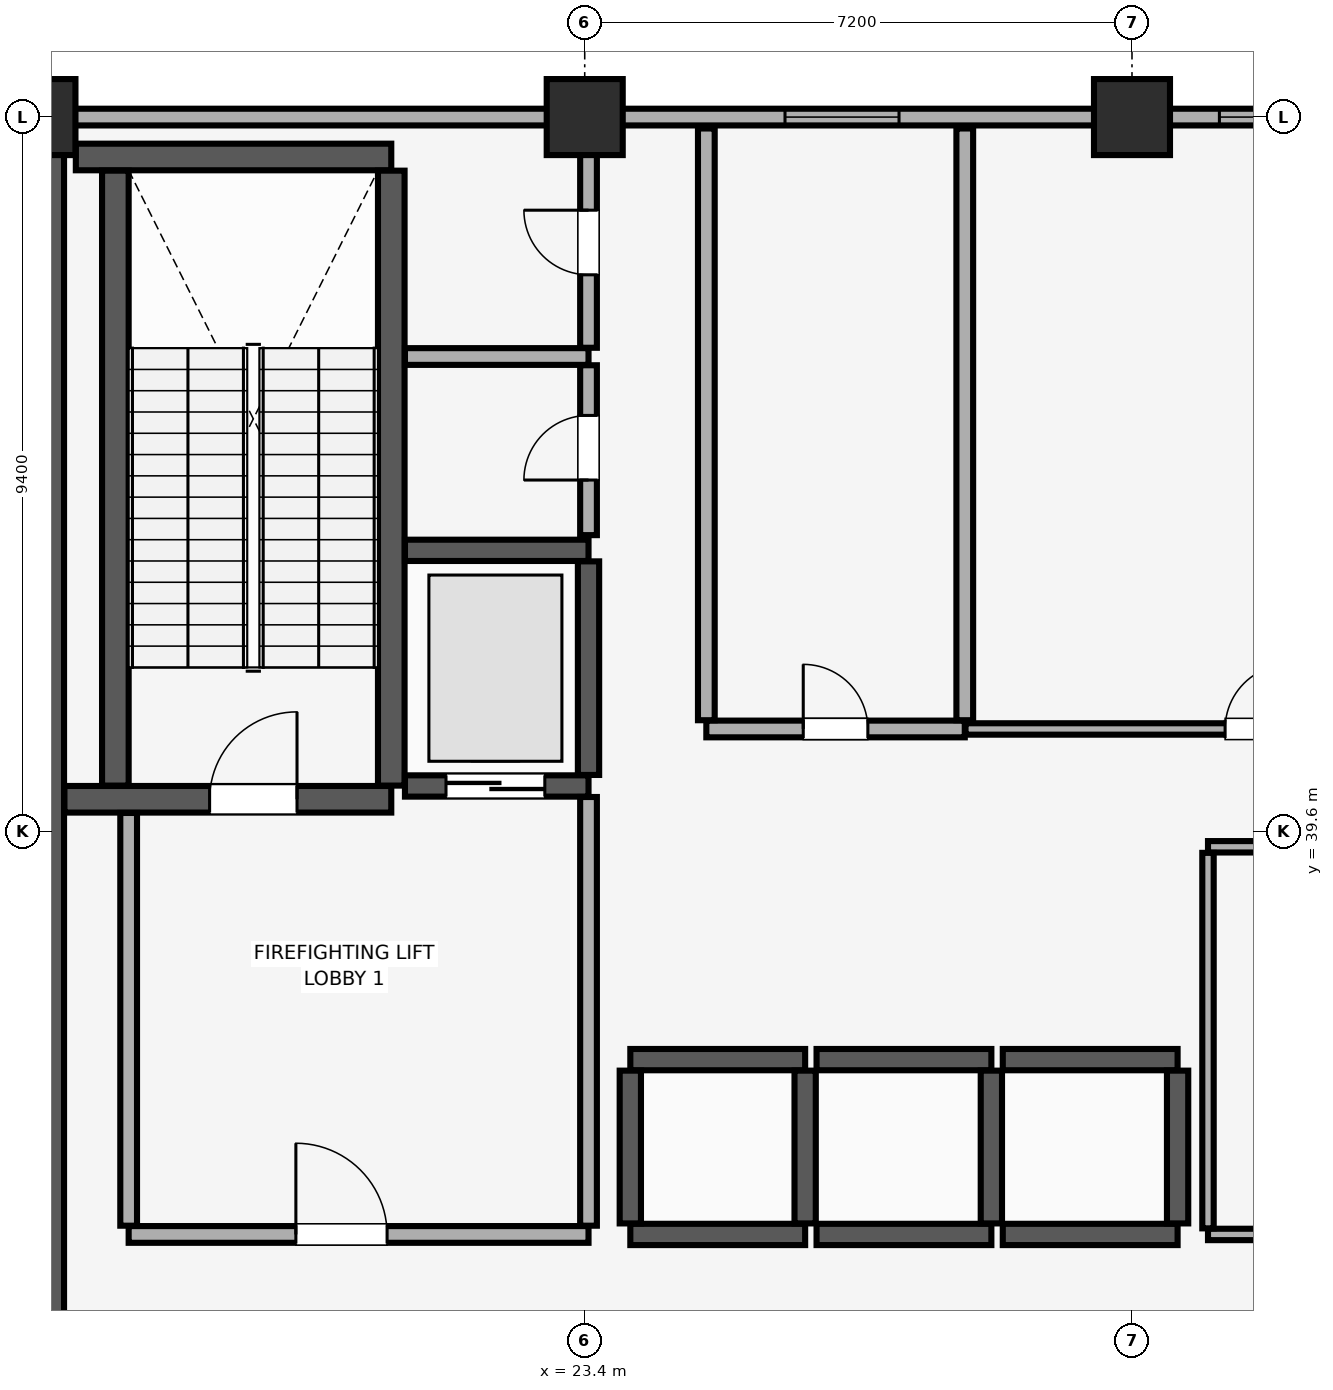
"""IFC4 building model, lengths in metres.
Left out: names, types, materials, properties, quantities, classifications, styles, units other than length and angle.
Written with IfcOpenShell. Run it as: python <this file> out.ifc"""

import sys

from ifc_helpers import new_model, si_unit, direction, frame, frame_2d, origin, origin_2d, place, context, subcontext, project, spatial, rectangle, extrude, element, fill, save


model = new_model("IFC4")
c1 = context("Model", 3, precision=1e-05, world=origin(), true_north=direction((0.0, 1.0)))
c2 = subcontext(c1, "Body", "Model", "MODEL_VIEW")
j1 = project(units=[si_unit("LENGTHUNIT", "METRE"), si_unit("PLANEANGLEUNIT", "RADIAN")], contexts=[c1])
p1 = place(None, origin())
s1 = spatial("IfcSite", under=j1, at=p1, CompositionType="ELEMENT")
p2 = place(p1, origin())
s2 = spatial("IfcBuilding", under=s1, at=p2, CompositionType="ELEMENT")
p3 = place(p2, frame((0.0, 0.0, 294.7)))
s3 = spatial("IfcBuildingStorey", under=s2, at=p3, CompositionType="ELEMENT", Elevation=294.7)
for number, where, z_axis, x_axis in (
    (1, (16.2, 49.0, 0.0), (0.0, 0.0, 1.0), (1.0, 0.0, 0.0)),
    (2, (23.4, 49.0, 0.0), (0.0, 0.0, 1.0), (1.0, 0.0, 0.0)),
    (3, (30.6, 49.0, 0.0), (0.0, 0.0, 1.0), (1.0, 0.0, 0.0)),
):
    element("IfcColumn", number, at=place(p3, frame(where, z_axis=z_axis, x_axis=x_axis)), inside=s3, PredefinedType="COLUMN", context=c2, shape_type="SweptSolid", body=[
        extrude(rectangle(XDim=1.0, YDim=1.0, at=origin_2d()), origin(), (0.0, 0.0, 1.0), 5.12),
    ])
p4 = place(p3, frame((71.4, 49.0, 0.0), z_axis=(0.0, 0.0, 1.0), x_axis=(-1.0, 0.0, 0.0)))
e4 = element("IfcWall", 4, at=p4, inside=s3, PredefinedType="SOLIDWALL", context=c2, shape_type="SweptSolid", body=[
    extrude(rectangle(XDim=58.8, YDim=0.22, at=frame_2d((29.4, 0.0))), origin(), (0.0, 0.0, 1.0), 4.32),
])
p5 = place(p4, frame((56.365, 0.0, 0.85)))
e5 = element("IfcOpeningElement", 5, at=p5, cuts=e4, PredefinedType="OPENING", context=c2, shape_type="SweptSolid", body=[
    extrude(rectangle(XDim=1.5, YDim=1.4, at=frame_2d((0.75, 0.7))), frame((0.0, 0.12, 0.0), z_axis=(0.0, -1.0, 0.0), x_axis=(1.0, 0.0, 0.0)), (0.0, 0.0, 1.0), 0.24),
])
p6 = place(p4, frame((0.935, 0.0, 0.85)))
e6 = element("IfcOpeningElement", 6, at=p6, cuts=e4, PredefinedType="OPENING", context=c2, shape_type="SweptSolid", body=[
    extrude(rectangle(XDim=1.5, YDim=1.4, at=frame_2d((0.75, 0.7))), frame((0.0, 0.12, 0.0), z_axis=(0.0, -1.0, 0.0), x_axis=(1.0, 0.0, 0.0)), (0.0, 0.0, 1.0), 0.24),
])
p7 = place(p4, frame((43.865, 0.0, 0.9)))
e7 = element("IfcOpeningElement", 7, at=p7, cuts=e4, PredefinedType="OPENING", context=c2, shape_type="SweptSolid", body=[
    extrude(rectangle(XDim=1.5, YDim=1.4, at=frame_2d((0.75, 0.7))), frame((0.0, 0.12, 0.0), z_axis=(0.0, -1.0, 0.0), x_axis=(1.0, 0.0, 0.0)), (0.0, 0.0, 1.0), 0.24),
])
p8 = place(p4, frame((36.05, 0.0, 0.9)))
e8 = element("IfcOpeningElement", 8, at=p8, cuts=e4, PredefinedType="OPENING", context=c2, shape_type="SweptSolid", body=[
    extrude(rectangle(XDim=3.6, YDim=1.5, at=frame_2d((1.8, 0.75))), frame((0.0, 0.12, 0.0), z_axis=(0.0, -1.0, 0.0), x_axis=(1.0, 0.0, 0.0)), (0.0, 0.0, 1.0), 0.24),
])
p9 = place(p4, frame((22.65, 0.0, 0.9)))
e9 = element("IfcOpeningElement", 9, at=p9, cuts=e4, PredefinedType="OPENING", context=c2, shape_type="SweptSolid", body=[
    extrude(rectangle(XDim=1.5, YDim=1.4, at=frame_2d((0.75, 0.7))), frame((0.0, 0.12, 0.0), z_axis=(0.0, -1.0, 0.0), x_axis=(1.0, 0.0, 0.0)), (0.0, 0.0, 1.0), 0.24),
])
p10 = place(p4, frame((19.0, 0.0, 0.9)))
e10 = element("IfcOpeningElement", 10, at=p10, cuts=e4, PredefinedType="OPENING", context=c2, shape_type="SweptSolid", body=[
    extrude(rectangle(XDim=2.4, YDim=1.5, at=frame_2d((1.2, 0.75))), frame((0.0, 0.12, 0.0), z_axis=(0.0, -1.0, 0.0), x_axis=(1.0, 0.0, 0.0)), (0.0, 0.0, 1.0), 0.24),
])
p11 = place(p4, frame((14.635, 0.0, 0.9)))
e11 = element("IfcOpeningElement", 11, at=p11, cuts=e4, PredefinedType="OPENING", context=c2, shape_type="SweptSolid", body=[
    extrude(rectangle(XDim=2.4, YDim=1.5, at=frame_2d((1.2, 0.75))), frame((0.0, 0.12, 0.0), z_axis=(0.0, -1.0, 0.0), x_axis=(1.0, 0.0, 0.0)), (0.0, 0.0, 1.0), 0.24),
])
p12 = place(p3, frame((16.2, 29.4, 0.0), z_axis=(0.0, 0.0, 1.0), x_axis=(0.0, 1.0, 0.0)))
e12 = element("IfcWall", 12, at=p12, inside=s3, PredefinedType="SHEAR", context=c2, shape_type="SweptSolid", body=[
    extrude(rectangle(XDim=19.2, YDim=0.7, at=frame_2d((9.6, 0.0))), origin(), (0.0, 0.0, 1.0), 5.12),
])
p13 = place(p3, frame((16.555, 40.025, 0.0), z_axis=(0.0, 0.0, 1.0), x_axis=(1.0, 0.0, 0.0)))
e13 = element("IfcWall", 13, at=p13, inside=s3, PredefinedType="SHEAR", context=c2, shape_type="SweptSolid", body=[
    extrude(rectangle(XDim=4.3, YDim=0.35, at=frame_2d((2.15, 0.0))), origin(), (0.0, 0.0, 1.0), 5.12),
])
p14 = place(p13, frame((1.91, 0.0, 0.0)))
e14 = element("IfcOpeningElement", 14, at=p14, cuts=e13, PredefinedType="OPENING", context=c2, shape_type="SweptSolid", body=[
    extrude(rectangle(XDim=1.15, YDim=2.15, at=frame_2d((0.575, 1.075))), frame((0.0, 0.185, 0.0), z_axis=(0.0, -1.0, 0.0), x_axis=(1.0, 0.0, 0.0)), (0.0, 0.0, 1.0), 0.37),
])
p15 = place(p3, frame((16.705, 48.475, 0.0), z_axis=(0.0, 0.0, 1.0), x_axis=(1.0, 0.0, 0.0)))
e15 = element("IfcWall", 15, at=p15, inside=s3, PredefinedType="SHEAR", context=c2, shape_type="SweptSolid", body=[
    extrude(rectangle(XDim=4.15, YDim=0.35, at=frame_2d((2.075, 0.0))), origin(), (0.0, 0.0, 1.0), 5.12),
])
for number, where, z_axis, x_axis in (
    (16, (17.225, 40.205, 0.0), (0.0, 0.0, 1.0), (0.0, 1.0, 0.0)),
    (17, (20.855, 40.205, 0.0), (0.0, 0.0, 1.0), (0.0, 1.0, 0.0)),
):
    element("IfcWall", number, at=place(p3, frame(where, z_axis=z_axis, x_axis=x_axis)), inside=s3, PredefinedType="SHEAR", context=c2, shape_type="SweptSolid", body=[
        extrude(rectangle(XDim=8.09, YDim=0.35, at=frame_2d((4.045, 0.0))), origin(), (0.0, 0.0, 1.0), 5.12),
    ])
for number, where, z_axis, x_axis in (
    (18, (24.0, 34.3, 0.0), (0.0, 0.0, 1.0), (1.0, 0.0, 0.0)),
    (19, (24.0, 36.6, 0.0), (0.0, 0.0, 1.0), (1.0, 0.0, 0.0)),
):
    element("IfcWall", number, at=place(p3, frame(where, z_axis=z_axis, x_axis=x_axis)), inside=s3, PredefinedType="SHEAR", context=c2, shape_type="SweptSolid", body=[
        extrude(rectangle(XDim=2.3, YDim=0.28, at=frame_2d((1.15, 0.0))), origin(), (0.0, 0.0, 1.0), 5.12),
    ])
for number, where, z_axis, x_axis in (
    (20, (24.0, 34.445, 0.0), (0.0, 0.0, 1.0), (0.0, 1.0, 0.0)),
    (21, (26.3, 34.445, 0.0), (0.0, 0.0, 1.0), (0.0, 1.0, 0.0)),
):
    element("IfcWall", number, at=place(p3, frame(where, z_axis=z_axis, x_axis=x_axis)), inside=s3, PredefinedType="SHEAR", context=c2, shape_type="SweptSolid", body=[
        extrude(rectangle(XDim=2.01, YDim=0.28, at=frame_2d((1.005, 0.0))), origin(), (0.0, 0.0, 1.0), 5.12),
    ])
for number, where, z_axis, x_axis in (
    (22, (26.45, 34.3, 0.0), (0.0, 0.0, 1.0), (1.0, 0.0, 0.0)),
    (23, (26.45, 36.6, 0.0), (0.0, 0.0, 1.0), (1.0, 0.0, 0.0)),
):
    element("IfcWall", number, at=place(p3, frame(where, z_axis=z_axis, x_axis=x_axis)), inside=s3, PredefinedType="SHEAR", context=c2, shape_type="SweptSolid", body=[
        extrude(rectangle(XDim=2.3, YDim=0.28, at=frame_2d((1.15, 0.0))), origin(), (0.0, 0.0, 1.0), 5.12),
    ])
p16 = place(p3, frame((28.75, 34.445, 0.0), z_axis=(0.0, 0.0, 1.0), x_axis=(0.0, 1.0, 0.0)))
e24 = element("IfcWall", 24, at=p16, inside=s3, PredefinedType="SHEAR", context=c2, shape_type="SweptSolid", body=[
    extrude(rectangle(XDim=2.01, YDim=0.28, at=frame_2d((1.005, 0.0))), origin(), (0.0, 0.0, 1.0), 5.12),
])
for number, where, z_axis, x_axis in (
    (25, (28.9, 34.3, 0.0), (0.0, 0.0, 1.0), (1.0, 0.0, 0.0)),
    (26, (28.9, 36.6, 0.0), (0.0, 0.0, 1.0), (1.0, 0.0, 0.0)),
):
    element("IfcWall", number, at=place(p3, frame(where, z_axis=z_axis, x_axis=x_axis)), inside=s3, PredefinedType="SHEAR", context=c2, shape_type="SweptSolid", body=[
        extrude(rectangle(XDim=2.3, YDim=0.28, at=frame_2d((1.15, 0.0))), origin(), (0.0, 0.0, 1.0), 5.12),
    ])
p17 = place(p3, frame((31.2, 34.445, 0.0), z_axis=(0.0, 0.0, 1.0), x_axis=(0.0, 1.0, 0.0)))
e27 = element("IfcWall", 27, at=p17, inside=s3, PredefinedType="SHEAR", context=c2, shape_type="SweptSolid", body=[
    extrude(rectangle(XDim=2.01, YDim=0.28, at=frame_2d((1.005, 0.0))), origin(), (0.0, 0.0, 1.0), 5.12),
])
p18 = place(p3, frame((21.035, 40.2, 0.0), z_axis=(0.0, 0.0, 1.0), x_axis=(1.0, 0.0, 0.0)))
e28 = element("IfcWall", 28, at=p18, inside=s3, PredefinedType="SHEAR", context=c2, shape_type="SweptSolid", body=[
    extrude(rectangle(XDim=2.415, YDim=0.28, at=frame_2d((1.208, 0.0))), origin(), (0.0, 0.0, 1.0), 5.12),
])
p19 = place(p18, frame((0.54, 0.0, 0.0)))
e29 = element("IfcOpeningElement", 29, at=p19, cuts=e28, PredefinedType="OPENING", context=c2, shape_type="SweptSolid", body=[
    extrude(rectangle(XDim=1.3, YDim=2.3, at=frame_2d((0.65, 1.15))), frame((0.0, 0.15, 0.0), z_axis=(0.0, -1.0, 0.0), x_axis=(1.0, 0.0, 0.0)), (0.0, 0.0, 1.0), 0.3),
])
p20 = place(p3, frame((21.035, 43.3, 0.0), z_axis=(0.0, 0.0, 1.0), x_axis=(1.0, 0.0, 0.0)))
e30 = element("IfcWall", 30, at=p20, inside=s3, PredefinedType="SHEAR", context=c2, shape_type="SweptSolid", body=[
    extrude(rectangle(XDim=2.415, YDim=0.28, at=frame_2d((1.208, 0.0))), origin(), (0.0, 0.0, 1.0), 5.12),
])
p21 = place(p3, frame((23.45, 40.345, 0.0), z_axis=(0.0, 0.0, 1.0), x_axis=(0.0, 1.0, 0.0)))
e31 = element("IfcWall", 31, at=p21, inside=s3, PredefinedType="SHEAR", context=c2, shape_type="SweptSolid", body=[
    extrude(rectangle(XDim=2.81, YDim=0.28, at=frame_2d((1.405, 0.0))), origin(), (0.0, 0.0, 1.0), 5.12),
])
p22 = place(p3, frame((17.4, 34.3, 0.0), z_axis=(0.0, 0.0, 1.0), x_axis=(1.0, 0.0, 0.0)))
e32 = element("IfcWall", 32, at=p22, inside=s3, PredefinedType="PARTITIONING", context=c2, shape_type="SweptSolid", body=[
    extrude(rectangle(XDim=6.05, YDim=0.22, at=frame_2d((3.025, 0.0))), origin(), (0.0, 0.0, 1.0), 5.12),
])
p23 = place(p22, frame((2.2, 0.0, 0.0)))
e33 = element("IfcOpeningElement", 33, at=p23, cuts=e32, PredefinedType="OPENING", context=c2, shape_type="SweptSolid", body=[
    extrude(rectangle(XDim=1.2, YDim=2.15, at=frame_2d((0.6, 1.075))), frame((0.0, 0.12, 0.0), z_axis=(0.0, -1.0, 0.0), x_axis=(1.0, 0.0, 0.0)), (0.0, 0.0, 1.0), 0.24),
])
p24 = place(p3, frame((17.4, 34.415, 0.0), z_axis=(0.0, 0.0, 1.0), x_axis=(0.0, 1.0, 0.0)))
e34 = element("IfcWall", 34, at=p24, inside=s3, PredefinedType="PARTITIONING", context=c2, shape_type="SweptSolid", body=[
    extrude(rectangle(XDim=5.43, YDim=0.22, at=frame_2d((2.715, 0.0))), origin(), (0.0, 0.0, 1.0), 5.12),
])
p25 = place(p3, frame((23.45, 34.415, 0.0), z_axis=(0.0, 0.0, 1.0), x_axis=(0.0, 1.0, 0.0)))
e35 = element("IfcWall", 35, at=p25, inside=s3, PredefinedType="PARTITIONING", context=c2, shape_type="SweptSolid", body=[
    extrude(rectangle(XDim=5.64, YDim=0.22, at=frame_2d((2.82, 0.0))), origin(), (0.0, 0.0, 1.0), 5.12),
])
p26 = place(p3, frame((21.035, 45.85, 0.0), z_axis=(0.0, 0.0, 1.0), x_axis=(1.0, 0.0, 0.0)))
e36 = element("IfcWall", 36, at=p26, inside=s3, PredefinedType="PARTITIONING", context=c2, shape_type="SweptSolid", body=[
    extrude(rectangle(XDim=2.415, YDim=0.22, at=frame_2d((1.208, 0.0))), origin(), (0.0, 0.0, 1.0), 5.12),
])
p27 = place(p3, frame((23.45, 43.5, 0.0), z_axis=(0.0, 0.0, 1.0), x_axis=(0.0, 1.0, 0.0)))
e37 = element("IfcWall", 37, at=p27, inside=s3, PredefinedType="PARTITIONING", context=c2, shape_type="SweptSolid", body=[
    extrude(rectangle(XDim=2.235, YDim=0.22, at=frame_2d((1.118, 0.0))), origin(), (0.0, 0.0, 1.0), 5.12),
])
p28 = place(p27, frame((0.725, 0.0, 0.0)))
e38 = element("IfcOpeningElement", 38, at=p28, cuts=e37, PredefinedType="OPENING", context=c2, shape_type="SweptSolid", body=[
    extrude(rectangle(XDim=0.85, YDim=2.1, at=frame_2d((0.425, 1.05))), frame((0.0, 0.12, 0.0), z_axis=(0.0, -1.0, 0.0), x_axis=(1.0, 0.0, 0.0)), (0.0, 0.0, 1.0), 0.24),
])
p29 = place(p3, frame((23.45, 45.965, 0.0), z_axis=(0.0, 0.0, 1.0), x_axis=(0.0, 1.0, 0.0)))
e39 = element("IfcWall", 39, at=p29, inside=s3, PredefinedType="PARTITIONING", context=c2, shape_type="SweptSolid", body=[
    extrude(rectangle(XDim=2.885, YDim=0.22, at=frame_2d((1.442, 0.0))), origin(), (0.0, 0.0, 1.0), 5.12),
])
p30 = place(p29, frame((0.96, 0.0, 0.0)))
e40 = element("IfcOpeningElement", 40, at=p30, cuts=e39, PredefinedType="OPENING", context=c2, shape_type="SweptSolid", body=[
    extrude(rectangle(XDim=0.85, YDim=2.1, at=frame_2d((0.425, 1.05))), frame((0.0, 0.12, 0.0), z_axis=(0.0, -1.0, 0.0), x_axis=(1.0, 0.0, 0.0)), (0.0, 0.0, 1.0), 0.24),
])
p31 = place(p3, frame((31.6, 34.3, 0.0), z_axis=(0.0, 0.0, 1.0), x_axis=(1.0, 0.0, 0.0)))
e41 = element("IfcWall", 41, at=p31, inside=s3, PredefinedType="PARTITIONING", context=c2, shape_type="SweptSolid", body=[
    extrude(rectangle(XDim=5.2, YDim=0.15, at=frame_2d((2.6, 0.0))), origin(), (0.0, 0.0, 1.0), 5.12),
])
p32 = place(p31, frame((2.175, 0.0, 0.0)))
e42 = element("IfcOpeningElement", 42, at=p32, cuts=e41, PredefinedType="OPENING", context=c2, shape_type="SweptSolid", body=[
    extrude(rectangle(XDim=0.85, YDim=2.1, at=frame_2d((0.425, 1.05))), frame((0.0, 0.085, 0.0), z_axis=(0.0, -1.0, 0.0), x_axis=(1.0, 0.0, 0.0)), (0.0, 0.0, 1.0), 0.17),
])
p33 = place(p3, frame((31.6, 39.4, 0.0), z_axis=(0.0, 0.0, 1.0), x_axis=(1.0, 0.0, 0.0)))
e43 = element("IfcWall", 43, at=p33, inside=s3, PredefinedType="PARTITIONING", context=c2, shape_type="SweptSolid", body=[
    extrude(rectangle(XDim=5.2, YDim=0.15, at=frame_2d((2.6, 0.0))), origin(), (0.0, 0.0, 1.0), 5.12),
])
p34 = place(p3, frame((31.6, 34.38, 0.0), z_axis=(0.0, 0.0, 1.0), x_axis=(0.0, 1.0, 0.0)))
e44 = element("IfcWall", 44, at=p34, inside=s3, PredefinedType="PARTITIONING", context=c2, shape_type="SweptSolid", body=[
    extrude(rectangle(XDim=4.94, YDim=0.15, at=frame_2d((2.47, 0.0))), origin(), (0.0, 0.0, 1.0), 5.12),
])
p35 = place(p3, frame((25.0, 40.95, 0.0), z_axis=(0.0, 0.0, 1.0), x_axis=(1.0, 0.0, 0.0)))
e45 = element("IfcWall", 45, at=p35, inside=s3, PredefinedType="PARTITIONING", context=c2, shape_type="SweptSolid", body=[
    extrude(rectangle(XDim=3.4, YDim=0.22, at=frame_2d((1.7, 0.0))), origin(), (0.0, 0.0, 1.0), 5.12),
])
p36 = place(p35, frame((1.275, 0.0, 0.0)))
e46 = element("IfcOpeningElement", 46, at=p36, cuts=e45, PredefinedType="OPENING", context=c2, shape_type="SweptSolid", body=[
    extrude(rectangle(XDim=0.85, YDim=2.1, at=frame_2d((0.425, 1.05))), frame((0.0, 0.12, 0.0), z_axis=(0.0, -1.0, 0.0), x_axis=(1.0, 0.0, 0.0)), (0.0, 0.0, 1.0), 0.24),
])
for number, where, z_axis, x_axis in (
    (47, (25.0, 41.065, 0.0), (0.0, 0.0, 1.0), (0.0, 1.0, 0.0)),
    (48, (28.4, 41.065, 0.0), (0.0, 0.0, 1.0), (0.0, 1.0, 0.0)),
):
    element("IfcWall", number, at=place(p3, frame(where, z_axis=z_axis, x_axis=x_axis)), inside=s3, PredefinedType="PARTITIONING", context=c2, shape_type="SweptSolid", body=[
        extrude(rectangle(XDim=7.785, YDim=0.22, at=frame_2d((3.893, 0.0))), origin(), (0.0, 0.0, 1.0), 5.12),
    ])
p37 = place(p3, frame((28.41, 40.95, 0.0), z_axis=(0.0, 0.0, 1.0), x_axis=(1.0, 0.0, 0.0)))
e49 = element("IfcWall", 49, at=p37, inside=s3, PredefinedType="PARTITIONING", context=c2, shape_type="SweptSolid", body=[
    extrude(rectangle(XDim=7.69, YDim=0.15, at=frame_2d((3.845, 0.0))), origin(), (0.0, 0.0, 1.0), 5.12),
])
p38 = place(p37, frame((3.415, 0.0, 0.0)))
e50 = element("IfcOpeningElement", 50, at=p38, cuts=e49, PredefinedType="OPENING", context=c2, shape_type="SweptSolid", body=[
    extrude(rectangle(XDim=0.85, YDim=2.1, at=frame_2d((0.425, 1.05))), frame((0.0, 0.085, 0.0), z_axis=(0.0, -1.0, 0.0), x_axis=(1.0, 0.0, 0.0)), (0.0, 0.0, 1.0), 0.17),
])
p39 = place(p7, origin())
e51 = element("IfcWindow", 51, at=p39, inside=s3, PartitioningType="SINGLE_PANEL", PredefinedType="WINDOW", context=c2, shape_type="SweptSolid", body=[
    extrude(rectangle(XDim=1.5, YDim=1.4, at=frame_2d((0.75, 0.7))), frame((0.0, 0.03, 0.0), z_axis=(0.0, -1.0, 0.0), x_axis=(1.0, 0.0, 0.0)), (0.0, 0.0, 1.0), 0.06),
])
fill(e7, e51)
p40 = place(p8, origin())
e52 = element("IfcWindow", 52, at=p40, inside=s3, PartitioningType="SINGLE_PANEL", PredefinedType="WINDOW", context=c2, shape_type="SweptSolid", body=[
    extrude(rectangle(XDim=3.6, YDim=1.5, at=frame_2d((1.8, 0.75))), frame((0.0, 0.03, 0.0), z_axis=(0.0, -1.0, 0.0), x_axis=(1.0, 0.0, 0.0)), (0.0, 0.0, 1.0), 0.06),
])
fill(e8, e52)
p41 = place(p14, origin())
e53 = element("IfcDoor", 53, at=p41, inside=s3, OperationType="SINGLE_SWING_RIGHT", PredefinedType="DOOR", context=c2, shape_type="SweptSolid", body=[
    extrude(rectangle(XDim=1.15, YDim=2.15, at=frame_2d((0.575, 1.075))), frame((0.0, 0.025, 0.0), z_axis=(0.0, -1.0, 0.0), x_axis=(1.0, 0.0, 0.0)), (0.0, 0.0, 1.0), 0.05),
])
fill(e14, e53)
p42 = place(p19, origin())
e54 = element("IfcDoor", 54, at=p42, inside=s3, OperationType="DOUBLE_DOOR_SLIDING", PredefinedType="DOOR", context=c2, shape_type="SweptSolid", body=[
    extrude(rectangle(XDim=1.3, YDim=2.3, at=frame_2d((0.65, 1.15))), frame((0.0, 0.025, 0.0), z_axis=(0.0, -1.0, 0.0), x_axis=(1.0, 0.0, 0.0)), (0.0, 0.0, 1.0), 0.05),
])
fill(e29, e54)
p43 = place(p23, origin())
e55 = element("IfcDoor", 55, at=p43, inside=s3, OperationType="SINGLE_SWING_LEFT", PredefinedType="DOOR", context=c2, shape_type="SweptSolid", body=[
    extrude(rectangle(XDim=1.2, YDim=2.15, at=frame_2d((0.6, 1.075))), frame((0.0, 0.025, 0.0), z_axis=(0.0, -1.0, 0.0), x_axis=(1.0, 0.0, 0.0)), (0.0, 0.0, 1.0), 0.05),
])
fill(e33, e55)
p44 = place(p28, origin())
e56 = element("IfcDoor", 56, at=p44, inside=s3, OperationType="SINGLE_SWING_LEFT", PredefinedType="DOOR", context=c2, shape_type="SweptSolid", body=[
    extrude(rectangle(XDim=0.85, YDim=2.1, at=frame_2d((0.425, 1.05))), frame((0.0, 0.025, 0.0), z_axis=(0.0, -1.0, 0.0), x_axis=(1.0, 0.0, 0.0)), (0.0, 0.0, 1.0), 0.05),
])
fill(e38, e56)
p45 = place(p30, origin())
e57 = element("IfcDoor", 57, at=p45, inside=s3, OperationType="SINGLE_SWING_RIGHT", PredefinedType="DOOR", context=c2, shape_type="SweptSolid", body=[
    extrude(rectangle(XDim=0.85, YDim=2.1, at=frame_2d((0.425, 1.05))), frame((0.0, 0.025, 0.0), z_axis=(0.0, -1.0, 0.0), x_axis=(1.0, 0.0, 0.0)), (0.0, 0.0, 1.0), 0.05),
])
fill(e40, e57)
p46 = place(p36, origin())
e58 = element("IfcDoor", 58, at=p46, inside=s3, OperationType="SINGLE_SWING_LEFT", PredefinedType="DOOR", context=c2, shape_type="SweptSolid", body=[
    extrude(rectangle(XDim=0.85, YDim=2.1, at=frame_2d((0.425, 1.05))), frame((0.0, 0.025, 0.0), z_axis=(0.0, -1.0, 0.0), x_axis=(1.0, 0.0, 0.0)), (0.0, 0.0, 1.0), 0.05),
])
fill(e46, e58)
p47 = place(p38, origin())
e59 = element("IfcDoor", 59, at=p47, inside=s3, OperationType="SINGLE_SWING_RIGHT", PredefinedType="DOOR", context=c2, shape_type="SweptSolid", body=[
    extrude(rectangle(XDim=0.85, YDim=2.1, at=frame_2d((0.425, 1.05))), frame((0.0, 0.025, 0.0), z_axis=(0.0, -1.0, 0.0), x_axis=(1.0, 0.0, 0.0)), (0.0, 0.0, 1.0), 0.05),
])
fill(e50, e59)
save(model, sys.argv[1])
